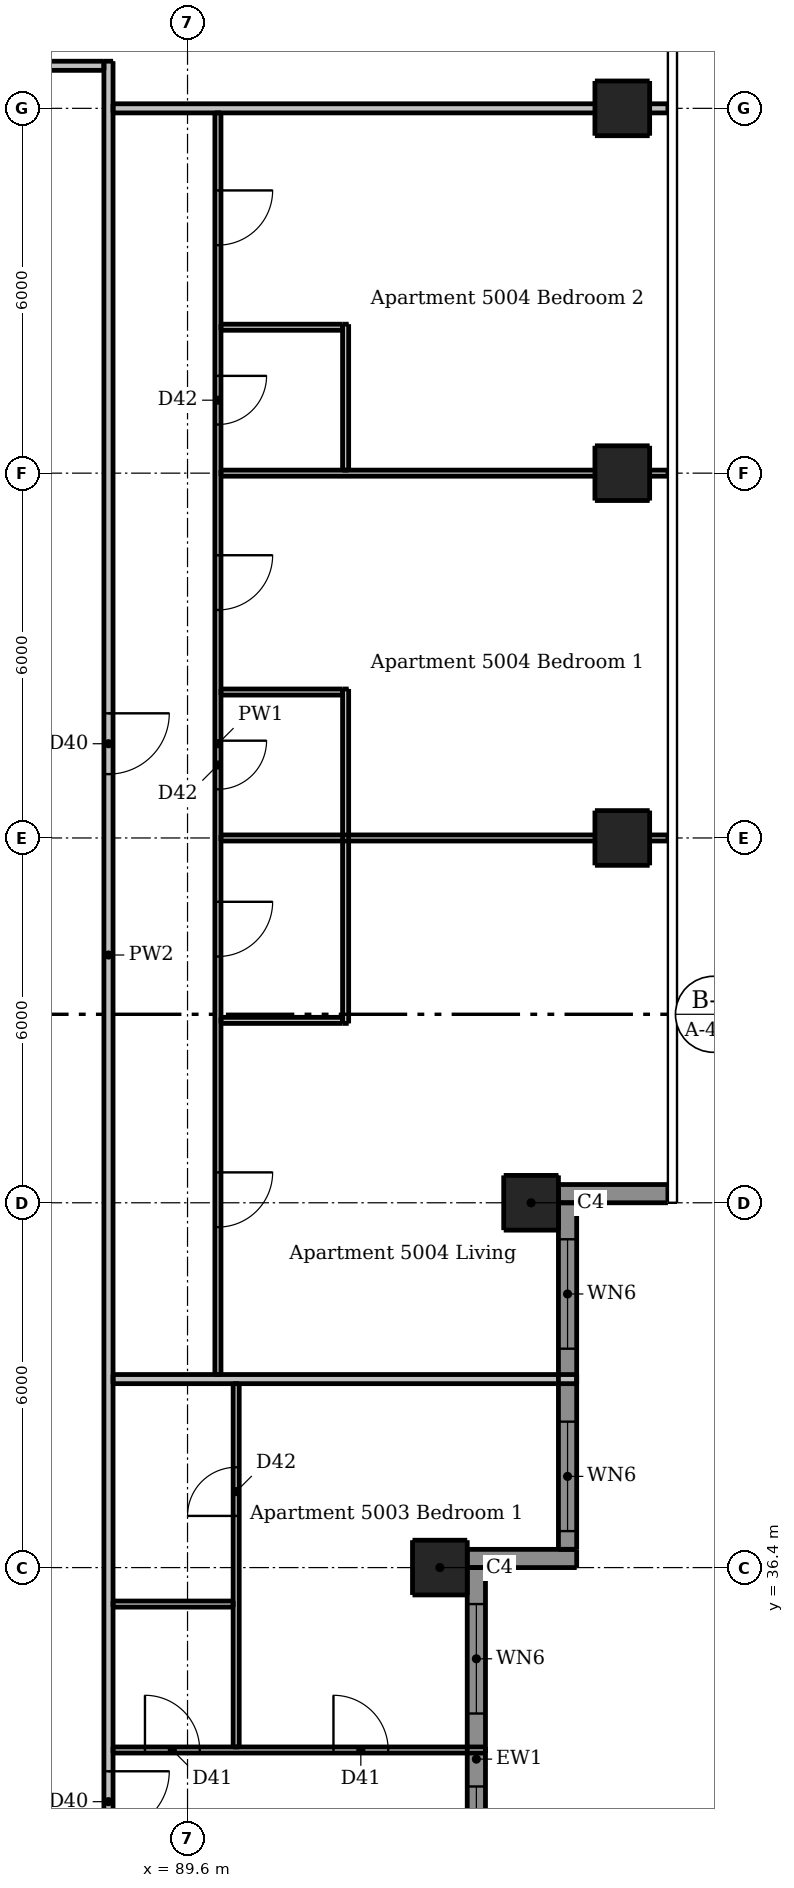
"""IFC4 building model, lengths in metres.
Left out: names, types, materials, properties, quantities, classifications, styles, units other than length and angle.
Written with IfcOpenShell. Run it as: python <this file> out.ifc"""

import sys

from ifc_helpers import new_model, si_unit, direction, frame, frame_2d, origin, origin_2d, place, context, subcontext, project, spatial, rectangle, extrude, element, fill, save


model = new_model("IFC4")
c1 = context("Model", 3, precision=1e-05, world=origin(), true_north=direction((0.0, 1.0)))
c2 = subcontext(c1, "Body", "Model", "MODEL_VIEW")
j1 = project(units=[si_unit("LENGTHUNIT", "METRE"), si_unit("PLANEANGLEUNIT", "RADIAN")], contexts=[c1])
p1 = place(None, origin())
s1 = spatial("IfcSite", under=j1, at=p1, CompositionType="ELEMENT")
p2 = place(p1, origin())
s2 = spatial("IfcBuilding", under=s1, at=p2, CompositionType="ELEMENT")
p3 = place(p2, frame((0.0, 0.0, 190.3)))
s3 = spatial("IfcBuildingStorey", under=s2, at=p3, CompositionType="ELEMENT", Elevation=190.3)
for number, where, z_axis, x_axis in (
    (1, (93.75, 36.4, 0.0), (0.0, 0.0, 1.0), (1.0, 0.0, 0.0)),
    (2, (95.25, 42.4, 0.0), (0.0, 0.0, 1.0), (1.0, 0.0, 0.0)),
    (3, (96.75, 48.4, 0.0), (0.0, 0.0, 1.0), (1.0, 0.0, 0.0)),
    (4, (96.75, 54.4, 0.0), (0.0, 0.0, 1.0), (1.0, 0.0, 0.0)),
    (5, (96.75, 60.4, 0.0), (0.0, 0.0, 1.0), (1.0, 0.0, 0.0)),
):
    element("IfcColumn", number, at=place(p3, frame(where, z_axis=z_axis, x_axis=x_axis)), inside=s3, PredefinedType="COLUMN", context=c2, shape_type="SweptSolid", body=[
        extrude(rectangle(XDim=0.9, YDim=0.9, at=origin_2d()), origin(), (0.0, 0.0, 1.0), 3.05),
    ])
for number, where, z_axis, x_axis in (
    (6, (94.2, 36.55, 0.0), (0.0, 0.0, 1.0), (1.0, 0.0, 0.0)),
    (7, (95.7, 42.55, 0.0), (0.0, 0.0, 1.0), (1.0, 0.0, 0.0)),
):
    element("IfcWall", number, at=place(p3, frame(where, z_axis=z_axis, x_axis=x_axis)), inside=s3, PredefinedType="SOLIDWALL", context=c2, shape_type="SweptSolid", body=[
        extrude(rectangle(XDim=1.8, YDim=0.3, at=frame_2d((0.9, 0.0))), origin(), (0.0, 0.0, 1.0), 3.05),
    ])
p4 = place(p3, frame((94.35, 30.1, 0.0), z_axis=(0.0, 0.0, 1.0), x_axis=(0.0, 1.0, 0.0)))
e8 = element("IfcWall", 8, at=p4, inside=s3, PredefinedType="SOLIDWALL", context=c2, shape_type="SweptSolid", body=[
    extrude(rectangle(XDim=6.3, YDim=0.3, at=frame_2d((3.15, 0.0))), origin(), (0.0, 0.0, 1.0), 3.05),
])
p5 = place(p4, frame((0.9, 0.0, 0.15)))
e9 = element("IfcOpeningElement", 9, at=p5, cuts=e8, PredefinedType="OPENING", context=c2, shape_type="SweptSolid", body=[
    extrude(rectangle(XDim=1.8, YDim=2.1, at=frame_2d((0.9, 1.05))), frame((0.0, 0.16, 0.0), z_axis=(0.0, -1.0, 0.0), x_axis=(1.0, 0.0, 0.0)), (0.0, 0.0, 1.0), 0.32),
])
p6 = place(p4, frame((3.9, 0.0, 0.15)))
e10 = element("IfcOpeningElement", 10, at=p6, cuts=e8, PredefinedType="OPENING", context=c2, shape_type="SweptSolid", body=[
    extrude(rectangle(XDim=1.8, YDim=2.1, at=frame_2d((0.9, 1.05))), frame((0.0, 0.16, 0.0), z_axis=(0.0, -1.0, 0.0), x_axis=(1.0, 0.0, 0.0)), (0.0, 0.0, 1.0), 0.32),
])
p7 = place(p3, frame((95.85, 36.7, 0.0), z_axis=(0.0, 0.0, 1.0), x_axis=(0.0, 1.0, 0.0)))
e11 = element("IfcWall", 11, at=p7, inside=s3, PredefinedType="SOLIDWALL", context=c2, shape_type="SweptSolid", body=[
    extrude(rectangle(XDim=5.7, YDim=0.3, at=frame_2d((2.85, 0.0))), origin(), (0.0, 0.0, 1.0), 3.05),
])
p8 = place(p7, frame((0.3, 0.0, 0.15)))
e12 = element("IfcOpeningElement", 12, at=p8, cuts=e11, PredefinedType="OPENING", context=c2, shape_type="SweptSolid", body=[
    extrude(rectangle(XDim=1.8, YDim=2.1, at=frame_2d((0.9, 1.05))), frame((0.0, 0.16, 0.0), z_axis=(0.0, -1.0, 0.0), x_axis=(1.0, 0.0, 0.0)), (0.0, 0.0, 1.0), 0.32),
])
p9 = place(p7, frame((3.3, 0.0, 0.15)))
e13 = element("IfcOpeningElement", 13, at=p9, cuts=e11, PredefinedType="OPENING", context=c2, shape_type="SweptSolid", body=[
    extrude(rectangle(XDim=1.8, YDim=2.1, at=frame_2d((0.9, 1.05))), frame((0.0, 0.16, 0.0), z_axis=(0.0, -1.0, 0.0), x_axis=(1.0, 0.0, 0.0)), (0.0, 0.0, 1.0), 0.32),
])
p10 = place(p3, frame((90.1, 60.325, 0.0), z_axis=(0.0, 0.0, 1.0), x_axis=(0.0, -1.0, 0.0)))
e14 = element("IfcWall", 14, at=p10, inside=s3, PredefinedType="PARTITIONING", context=c2, shape_type="SweptSolid", body=[
    extrude(rectangle(XDim=20.75, YDim=0.1, at=frame_2d((10.375, 0.0))), origin(), (0.0, 0.0, 1.0), 3.05),
])
p11 = place(p10, frame((17.425, 0.0, 0.0)))
e15 = element("IfcOpeningElement", 15, at=p11, cuts=e14, PredefinedType="OPENING", context=c2, shape_type="SweptSolid", body=[
    extrude(rectangle(XDim=0.9, YDim=2.1, at=frame_2d((0.45, 1.05))), frame((0.0, 0.06, 0.0), z_axis=(0.0, -1.0, 0.0), x_axis=(1.0, 0.0, 0.0)), (0.0, 0.0, 1.0), 0.12),
])
p12 = place(p10, frame((12.975, 0.0, 0.0)))
e16 = element("IfcOpeningElement", 16, at=p12, cuts=e14, PredefinedType="OPENING", context=c2, shape_type="SweptSolid", body=[
    extrude(rectangle(XDim=0.9, YDim=2.1, at=frame_2d((0.45, 1.05))), frame((0.0, 0.06, 0.0), z_axis=(0.0, -1.0, 0.0), x_axis=(1.0, 0.0, 0.0)), (0.0, 0.0, 1.0), 0.12),
])
p13 = place(p10, frame((7.275, 0.0, 0.0)))
e17 = element("IfcOpeningElement", 17, at=p13, cuts=e14, PredefinedType="OPENING", context=c2, shape_type="SweptSolid", body=[
    extrude(rectangle(XDim=0.9, YDim=2.1, at=frame_2d((0.45, 1.05))), frame((0.0, 0.06, 0.0), z_axis=(0.0, -1.0, 0.0), x_axis=(1.0, 0.0, 0.0)), (0.0, 0.0, 1.0), 0.12),
])
p14 = place(p10, frame((1.275, 0.0, 0.0)))
e18 = element("IfcOpeningElement", 18, at=p14, cuts=e14, PredefinedType="OPENING", context=c2, shape_type="SweptSolid", body=[
    extrude(rectangle(XDim=0.9, YDim=2.1, at=frame_2d((0.45, 1.05))), frame((0.0, 0.06, 0.0), z_axis=(0.0, -1.0, 0.0), x_axis=(1.0, 0.0, 0.0)), (0.0, 0.0, 1.0), 0.12),
])
p15 = place(p10, frame((10.325, 0.0, 0.0)))
e19 = element("IfcOpeningElement", 19, at=p15, cuts=e14, PredefinedType="OPENING", context=c2, shape_type="SweptSolid", body=[
    extrude(rectangle(XDim=0.8, YDim=2.1, at=frame_2d((0.4, 1.05))), frame((0.0, 0.06, 0.0), z_axis=(0.0, -1.0, 0.0), x_axis=(1.0, 0.0, 0.0)), (0.0, 0.0, 1.0), 0.12),
])
p16 = place(p10, frame((4.325, 0.0, 0.0)))
e20 = element("IfcOpeningElement", 20, at=p16, cuts=e14, PredefinedType="OPENING", context=c2, shape_type="SweptSolid", body=[
    extrude(rectangle(XDim=0.8, YDim=2.1, at=frame_2d((0.4, 1.05))), frame((0.0, 0.06, 0.0), z_axis=(0.0, -1.0, 0.0), x_axis=(1.0, 0.0, 0.0)), (0.0, 0.0, 1.0), 0.12),
])
p17 = place(p3, frame((90.4, 33.45, 0.0), z_axis=(0.0, 0.0, 1.0), x_axis=(0.0, 1.0, 0.0)))
e21 = element("IfcWall", 21, at=p17, inside=s3, PredefinedType="PARTITIONING", context=c2, shape_type="SweptSolid", body=[
    extrude(rectangle(XDim=5.975, YDim=0.1, at=frame_2d((2.988, 0.0))), origin(), (0.0, 0.0, 1.0), 3.05),
])
p18 = place(p17, frame((3.8, 0.0, 0.0)))
e22 = element("IfcOpeningElement", 22, at=p18, cuts=e21, PredefinedType="OPENING", context=c2, shape_type="SweptSolid", body=[
    extrude(rectangle(XDim=0.8, YDim=2.1, at=frame_2d((0.4, 1.05))), frame((0.0, 0.06, 0.0), z_axis=(0.0, -1.0, 0.0), x_axis=(1.0, 0.0, 0.0)), (0.0, 0.0, 1.0), 0.12),
])
p19 = place(p3, frame((92.2, 45.35, 0.0), z_axis=(0.0, 0.0, 1.0), x_axis=(0.0, 1.0, 0.0)))
e23 = element("IfcWall", 23, at=p19, inside=s3, PredefinedType="PARTITIONING", context=c2, shape_type="SweptSolid", body=[
    extrude(rectangle(XDim=5.5, YDim=0.1, at=frame_2d((2.75, 0.0))), origin(), (0.0, 0.0, 1.0), 3.05),
])
p20 = place(p3, frame((92.2, 54.45, 0.0), z_axis=(0.0, 0.0, 1.0), x_axis=(0.0, 1.0, 0.0)))
e24 = element("IfcWall", 24, at=p20, inside=s3, PredefinedType="PARTITIONING", context=c2, shape_type="SweptSolid", body=[
    extrude(rectangle(XDim=2.4, YDim=0.1, at=frame_2d((1.2, 0.0))), origin(), (0.0, 0.0, 1.0), 3.05),
])
p21 = place(p3, frame((90.15, 56.8, 0.0), z_axis=(0.0, 0.0, 1.0), x_axis=(1.0, 0.0, 0.0)))
e25 = element("IfcWall", 25, at=p21, inside=s3, PredefinedType="PARTITIONING", context=c2, shape_type="SweptSolid", body=[
    extrude(rectangle(XDim=2.0, YDim=0.1, at=frame_2d((1.0, 0.0))), origin(), (0.0, 0.0, 1.0), 3.05),
])
p22 = place(p3, frame((90.15, 54.4, 0.0), z_axis=(0.0, 0.0, 1.0), x_axis=(1.0, 0.0, 0.0)))
e26 = element("IfcWall", 26, at=p22, inside=s3, PredefinedType="PARTITIONING", context=c2, shape_type="SweptSolid", body=[
    extrude(rectangle(XDim=7.35, YDim=0.1, at=frame_2d((3.675, 0.0))), origin(), (0.0, 0.0, 1.0), 2.516),
])
p23 = place(p3, frame((90.15, 50.8, 0.0), z_axis=(0.0, 0.0, 1.0), x_axis=(1.0, 0.0, 0.0)))
e27 = element("IfcWall", 27, at=p23, inside=s3, PredefinedType="PARTITIONING", context=c2, shape_type="SweptSolid", body=[
    extrude(rectangle(XDim=2.0, YDim=0.1, at=frame_2d((1.0, 0.0))), origin(), (0.0, 0.0, 1.0), 3.05),
])
p24 = place(p3, frame((90.15, 48.4, 0.0), z_axis=(0.0, 0.0, 1.0), x_axis=(1.0, 0.0, 0.0)))
e28 = element("IfcWall", 28, at=p24, inside=s3, PredefinedType="PARTITIONING", context=c2, shape_type="SweptSolid", body=[
    extrude(rectangle(XDim=7.35, YDim=0.1, at=frame_2d((3.675, 0.0))), origin(), (0.0, 0.0, 1.0), 2.516),
])
p25 = place(p3, frame((90.15, 45.4, 0.0), z_axis=(0.0, 0.0, 1.0), x_axis=(1.0, 0.0, 0.0)))
e29 = element("IfcWall", 29, at=p25, inside=s3, PredefinedType="PARTITIONING", context=c2, shape_type="SweptSolid", body=[
    extrude(rectangle(XDim=2.0, YDim=0.1, at=frame_2d((1.0, 0.0))), origin(), (0.0, 0.0, 1.0), 3.05),
])
p26 = place(p3, frame((88.375, 35.8, 0.0), z_axis=(0.0, 0.0, 1.0), x_axis=(1.0, 0.0, 0.0)))
e30 = element("IfcWall", 30, at=p26, inside=s3, PredefinedType="PARTITIONING", context=c2, shape_type="SweptSolid", body=[
    extrude(rectangle(XDim=1.975, YDim=0.1, at=frame_2d((0.988, 0.0))), origin(), (0.0, 0.0, 1.0), 3.05),
])
p27 = place(p3, frame((88.375, 33.4, 0.0), z_axis=(0.0, 0.0, 1.0), x_axis=(1.0, 0.0, 0.0)))
e31 = element("IfcWall", 31, at=p27, inside=s3, PredefinedType="PARTITIONING", context=c2, shape_type="SweptSolid", body=[
    extrude(rectangle(XDim=6.125, YDim=0.1, at=frame_2d((3.062, 0.0))), origin(), (0.0, 0.0, 1.0), 3.05),
])
p28 = place(p27, frame((0.525, 0.0, 0.0)))
e32 = element("IfcOpeningElement", 32, at=p28, cuts=e31, PredefinedType="OPENING", context=c2, shape_type="SweptSolid", body=[
    extrude(rectangle(XDim=0.9, YDim=2.1, at=frame_2d((0.45, 1.05))), frame((0.0, 0.06, 0.0), z_axis=(0.0, -1.0, 0.0), x_axis=(1.0, 0.0, 0.0)), (0.0, 0.0, 1.0), 0.12),
])
p29 = place(p27, frame((3.625, 0.0, 0.0)))
e33 = element("IfcOpeningElement", 33, at=p29, cuts=e31, PredefinedType="OPENING", context=c2, shape_type="SweptSolid", body=[
    extrude(rectangle(XDim=0.9, YDim=2.1, at=frame_2d((0.45, 1.05))), frame((0.0, 0.06, 0.0), z_axis=(0.0, -1.0, 0.0), x_axis=(1.0, 0.0, 0.0)), (0.0, 0.0, 1.0), 0.12),
])
p30 = place(p3, frame((88.3, 61.175, 0.0), z_axis=(0.0, 0.0, 1.0), x_axis=(0.0, -1.0, 0.0)))
e34 = element("IfcWall", 34, at=p30, inside=s3, PredefinedType="PARTITIONING", context=c2, shape_type="SweptSolid", body=[
    extrude(rectangle(XDim=29.4, YDim=0.15, at=frame_2d((14.7, 0.0))), origin(), (0.0, 0.0, 1.0), 3.05),
])
p31 = place(p30, frame((28.125, 0.0, 0.0)))
e35 = element("IfcOpeningElement", 35, at=p31, cuts=e34, PredefinedType="OPENING", context=c2, shape_type="SweptSolid", body=[
    extrude(rectangle(XDim=1.0, YDim=2.1, at=frame_2d((0.5, 1.05))), frame((0.0, 0.085, 0.0), z_axis=(0.0, -1.0, 0.0), x_axis=(1.0, 0.0, 0.0)), (0.0, 0.0, 1.0), 0.17),
])
p32 = place(p30, frame((10.725, 0.0, 0.0)))
e36 = element("IfcOpeningElement", 36, at=p32, cuts=e34, PredefinedType="OPENING", context=c2, shape_type="SweptSolid", body=[
    extrude(rectangle(XDim=1.0, YDim=2.1, at=frame_2d((0.5, 1.05))), frame((0.0, 0.085, 0.0), z_axis=(0.0, -1.0, 0.0), x_axis=(1.0, 0.0, 0.0)), (0.0, 0.0, 1.0), 0.17),
])
p33 = place(p3, frame((58.975, 61.1, 0.0), z_axis=(0.0, 0.0, 1.0), x_axis=(1.0, 0.0, 0.0)))
e37 = element("IfcWall", 37, at=p33, inside=s3, PredefinedType="PARTITIONING", context=c2, shape_type="SweptSolid", body=[
    extrude(rectangle(XDim=29.25, YDim=0.15, at=frame_2d((14.625, 0.0))), origin(), (0.0, 0.0, 1.0), 3.05),
])
p34 = place(p33, frame((9.125, 0.0, 0.0)))
e38 = element("IfcOpeningElement", 38, at=p34, cuts=e37, PredefinedType="OPENING", context=c2, shape_type="SweptSolid", body=[
    extrude(rectangle(XDim=1.0, YDim=2.1, at=frame_2d((0.5, 1.05))), frame((0.0, 0.085, 0.0), z_axis=(0.0, -1.0, 0.0), x_axis=(1.0, 0.0, 0.0)), (0.0, 0.0, 1.0), 0.17),
])
p35 = place(p33, frame((26.475, 0.0, 0.0)))
e39 = element("IfcOpeningElement", 39, at=p35, cuts=e37, PredefinedType="OPENING", context=c2, shape_type="SweptSolid", body=[
    extrude(rectangle(XDim=1.0, YDim=2.1, at=frame_2d((0.5, 1.05))), frame((0.0, 0.085, 0.0), z_axis=(0.0, -1.0, 0.0), x_axis=(1.0, 0.0, 0.0)), (0.0, 0.0, 1.0), 0.17),
])
p36 = place(p3, frame((88.375, 60.4, 0.0), z_axis=(0.0, 0.0, 1.0), x_axis=(1.0, 0.0, 0.0)))
e40 = element("IfcWall", 40, at=p36, inside=s3, PredefinedType="PARTITIONING", context=c2, shape_type="SweptSolid", body=[
    extrude(rectangle(XDim=9.125, YDim=0.15, at=frame_2d((4.562, 0.0))), origin(), (0.0, 0.0, 1.0), 2.59),
])
p37 = place(p3, frame((88.375, 39.5, 0.0), z_axis=(0.0, 0.0, 1.0), x_axis=(1.0, 0.0, 0.0)))
e41 = element("IfcWall", 41, at=p37, inside=s3, PredefinedType="PARTITIONING", context=c2, shape_type="SweptSolid", body=[
    extrude(rectangle(XDim=7.625, YDim=0.15, at=frame_2d((3.812, 0.0))), origin(), (0.0, 0.0, 1.0), 3.05),
])
p38 = place(p5, origin())
e42 = element("IfcWindow", 42, at=p38, inside=s3, PartitioningType="DOUBLE_PANEL_VERTICAL", PredefinedType="WINDOW", context=c2, shape_type="SweptSolid", body=[
    extrude(rectangle(XDim=1.8, YDim=2.1, at=frame_2d((0.9, 1.05))), frame((0.0, 0.03, 0.0), z_axis=(0.0, -1.0, 0.0), x_axis=(1.0, 0.0, 0.0)), (0.0, 0.0, 1.0), 0.06),
])
fill(e9, e42)
p39 = place(p6, origin())
e43 = element("IfcWindow", 43, at=p39, inside=s3, PartitioningType="DOUBLE_PANEL_VERTICAL", PredefinedType="WINDOW", context=c2, shape_type="SweptSolid", body=[
    extrude(rectangle(XDim=1.8, YDim=2.1, at=frame_2d((0.9, 1.05))), frame((0.0, 0.03, 0.0), z_axis=(0.0, -1.0, 0.0), x_axis=(1.0, 0.0, 0.0)), (0.0, 0.0, 1.0), 0.06),
])
fill(e10, e43)
p40 = place(p8, origin())
e44 = element("IfcWindow", 44, at=p40, inside=s3, PartitioningType="DOUBLE_PANEL_VERTICAL", PredefinedType="WINDOW", context=c2, shape_type="SweptSolid", body=[
    extrude(rectangle(XDim=1.8, YDim=2.1, at=frame_2d((0.9, 1.05))), frame((0.0, 0.03, 0.0), z_axis=(0.0, -1.0, 0.0), x_axis=(1.0, 0.0, 0.0)), (0.0, 0.0, 1.0), 0.06),
])
fill(e12, e44)
p41 = place(p9, origin())
e45 = element("IfcWindow", 45, at=p41, inside=s3, PartitioningType="DOUBLE_PANEL_VERTICAL", PredefinedType="WINDOW", context=c2, shape_type="SweptSolid", body=[
    extrude(rectangle(XDim=1.8, YDim=2.1, at=frame_2d((0.9, 1.05))), frame((0.0, 0.03, 0.0), z_axis=(0.0, -1.0, 0.0), x_axis=(1.0, 0.0, 0.0)), (0.0, 0.0, 1.0), 0.06),
])
fill(e13, e45)
p42 = place(p31, origin())
e46 = element("IfcDoor", 46, at=p42, inside=s3, OperationType="SINGLE_SWING_LEFT", PredefinedType="DOOR", context=c2, shape_type="SweptSolid", body=[
    extrude(rectangle(XDim=1.0, YDim=2.1, at=frame_2d((0.5, 1.05))), frame((0.0, 0.025, 0.0), z_axis=(0.0, -1.0, 0.0), x_axis=(1.0, 0.0, 0.0)), (0.0, 0.0, 1.0), 0.05),
])
fill(e35, e46)
p43 = place(p28, origin())
e47 = element("IfcDoor", 47, at=p43, inside=s3, OperationType="SINGLE_SWING_LEFT", PredefinedType="DOOR", context=c2, shape_type="SweptSolid", body=[
    extrude(rectangle(XDim=0.9, YDim=2.1, at=frame_2d((0.45, 1.05))), frame((0.0, 0.025, 0.0), z_axis=(0.0, -1.0, 0.0), x_axis=(1.0, 0.0, 0.0)), (0.0, 0.0, 1.0), 0.05),
])
fill(e32, e47)
p44 = place(p29, origin())
e48 = element("IfcDoor", 48, at=p44, inside=s3, OperationType="SINGLE_SWING_LEFT", PredefinedType="DOOR", context=c2, shape_type="SweptSolid", body=[
    extrude(rectangle(XDim=0.9, YDim=2.1, at=frame_2d((0.45, 1.05))), frame((0.0, 0.025, 0.0), z_axis=(0.0, -1.0, 0.0), x_axis=(1.0, 0.0, 0.0)), (0.0, 0.0, 1.0), 0.05),
])
fill(e33, e48)
p45 = place(p18, origin())
e49 = element("IfcDoor", 49, at=p45, inside=s3, OperationType="SINGLE_SWING_LEFT", PredefinedType="DOOR", context=c2, shape_type="SweptSolid", body=[
    extrude(rectangle(XDim=0.8, YDim=2.1, at=frame_2d((0.4, 1.05))), frame((0.0, 0.025, 0.0), z_axis=(0.0, -1.0, 0.0), x_axis=(1.0, 0.0, 0.0)), (0.0, 0.0, 1.0), 0.05),
])
fill(e22, e49)
p46 = place(p32, origin())
e50 = element("IfcDoor", 50, at=p46, inside=s3, OperationType="SINGLE_SWING_LEFT", PredefinedType="DOOR", context=c2, shape_type="SweptSolid", body=[
    extrude(rectangle(XDim=1.0, YDim=2.1, at=frame_2d((0.5, 1.05))), frame((0.0, 0.025, 0.0), z_axis=(0.0, -1.0, 0.0), x_axis=(1.0, 0.0, 0.0)), (0.0, 0.0, 1.0), 0.05),
])
fill(e36, e50)
p47 = place(p11, origin())
e51 = element("IfcDoor", 51, at=p47, inside=s3, OperationType="SINGLE_SWING_LEFT", PredefinedType="DOOR", context=c2, shape_type="SweptSolid", body=[
    extrude(rectangle(XDim=0.9, YDim=2.1, at=frame_2d((0.45, 1.05))), frame((0.0, 0.025, 0.0), z_axis=(0.0, -1.0, 0.0), x_axis=(1.0, 0.0, 0.0)), (0.0, 0.0, 1.0), 0.05),
])
fill(e15, e51)
p48 = place(p12, origin())
e52 = element("IfcDoor", 52, at=p48, inside=s3, OperationType="SINGLE_SWING_LEFT", PredefinedType="DOOR", context=c2, shape_type="SweptSolid", body=[
    extrude(rectangle(XDim=0.9, YDim=2.1, at=frame_2d((0.45, 1.05))), frame((0.0, 0.025, 0.0), z_axis=(0.0, -1.0, 0.0), x_axis=(1.0, 0.0, 0.0)), (0.0, 0.0, 1.0), 0.05),
])
fill(e16, e52)
p49 = place(p13, origin())
e53 = element("IfcDoor", 53, at=p49, inside=s3, OperationType="SINGLE_SWING_LEFT", PredefinedType="DOOR", context=c2, shape_type="SweptSolid", body=[
    extrude(rectangle(XDim=0.9, YDim=2.1, at=frame_2d((0.45, 1.05))), frame((0.0, 0.025, 0.0), z_axis=(0.0, -1.0, 0.0), x_axis=(1.0, 0.0, 0.0)), (0.0, 0.0, 1.0), 0.05),
])
fill(e17, e53)
p50 = place(p14, origin())
e54 = element("IfcDoor", 54, at=p50, inside=s3, OperationType="SINGLE_SWING_LEFT", PredefinedType="DOOR", context=c2, shape_type="SweptSolid", body=[
    extrude(rectangle(XDim=0.9, YDim=2.1, at=frame_2d((0.45, 1.05))), frame((0.0, 0.025, 0.0), z_axis=(0.0, -1.0, 0.0), x_axis=(1.0, 0.0, 0.0)), (0.0, 0.0, 1.0), 0.05),
])
fill(e18, e54)
p51 = place(p15, origin())
e55 = element("IfcDoor", 55, at=p51, inside=s3, OperationType="SINGLE_SWING_LEFT", PredefinedType="DOOR", context=c2, shape_type="SweptSolid", body=[
    extrude(rectangle(XDim=0.8, YDim=2.1, at=frame_2d((0.4, 1.05))), frame((0.0, 0.025, 0.0), z_axis=(0.0, -1.0, 0.0), x_axis=(1.0, 0.0, 0.0)), (0.0, 0.0, 1.0), 0.05),
])
fill(e19, e55)
p52 = place(p16, origin())
e56 = element("IfcDoor", 56, at=p52, inside=s3, OperationType="SINGLE_SWING_LEFT", PredefinedType="DOOR", context=c2, shape_type="SweptSolid", body=[
    extrude(rectangle(XDim=0.8, YDim=2.1, at=frame_2d((0.4, 1.05))), frame((0.0, 0.025, 0.0), z_axis=(0.0, -1.0, 0.0), x_axis=(1.0, 0.0, 0.0)), (0.0, 0.0, 1.0), 0.05),
])
fill(e20, e56)
save(model, sys.argv[1])
